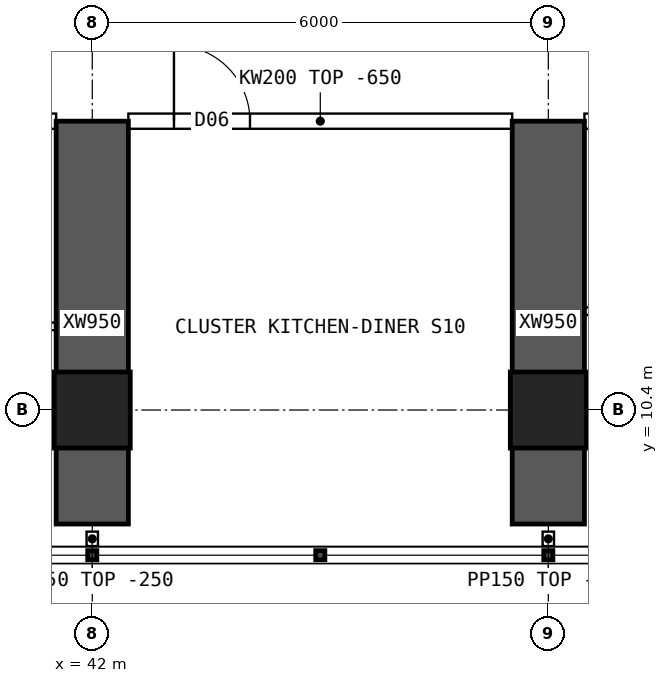
"""IFC4 building model, lengths in metres.
Left out: names, types, materials, properties, quantities, classifications, styles, units other than length and angle.
Written with IfcOpenShell. Run it as: python <this file> out.ifc"""

import sys

from ifc_helpers import new_model, si_unit, direction, frame, frame_2d, origin, origin_2d, place, context, subcontext, project, spatial, polyline, rectangle, hollow_rectangle, outline, extrude, element, fill, save


model = new_model("IFC4")
c1 = context("Model", 3, precision=1e-05, world=origin(), true_north=direction((0.0, 1.0)))
c2 = subcontext(c1, "Body", "Model", "MODEL_VIEW")
j1 = project(units=[si_unit("LENGTHUNIT", "METRE"), si_unit("PLANEANGLEUNIT", "RADIAN")], contexts=[c1])
p1 = place(None, origin())
s1 = spatial("IfcSite", under=j1, at=p1, CompositionType="ELEMENT")
p2 = place(p1, origin())
s2 = spatial("IfcBuilding", under=s1, at=p2, CompositionType="ELEMENT")
p3 = place(p2, frame((0.0, 0.0, 84.4)))
s3 = spatial("IfcBuildingStorey", under=s2, at=p3, CompositionType="ELEMENT", Elevation=84.4)
for number, where, z_axis, x_axis in (
    (1, (42.0, 10.4, 0.0), (0.0, 0.0, 1.0), (1.0, 0.0, 0.0)),
    (2, (48.0, 10.4, 0.0), (0.0, 0.0, 1.0), (1.0, 0.0, 0.0)),
):
    element("IfcColumn", number, at=place(p3, frame(where, z_axis=z_axis, x_axis=x_axis)), inside=s3, PredefinedType="COLUMN", context=c2, shape_type="SweptSolid", body=[
        extrude(hollow_rectangle(XDim=1.0, YDim=1.0, WallThickness=0.1, at=origin_2d()), origin(), (0.0, 0.0, 1.0), 3.75),
    ])
for number, where, z_axis, x_axis in (
    (3, (42.0, 8.9, 0.0), (0.0, 0.0, 1.0), (0.0, 1.0, 0.0)),
    (4, (48.0, 8.9, 0.0), (0.0, 0.0, 1.0), (0.0, 1.0, 0.0)),
):
    element("IfcWall", number, at=place(p3, frame(where, z_axis=z_axis, x_axis=x_axis)), inside=s3, PredefinedType="SHEAR", context=c2, shape_type="SweptSolid", body=[
        extrude(rectangle(XDim=5.3, YDim=0.95, at=frame_2d((2.65, 0.0))), origin(), (0.0, 0.0, 1.0), 3.75),
    ])
p4 = place(p3, frame((36.475, 14.2, 0.0), z_axis=(0.0, 0.0, 1.0), x_axis=(1.0, 0.0, 0.0)))
e5 = element("IfcWall", 5, at=p4, inside=s3, PredefinedType="SOLIDWALL", context=c2, shape_type="SweptSolid", body=[
    extrude(outline(polyline([(0.0, 0.0), (5.05, 0.0), (5.05, 3.1), (0.0, 3.1), (0.0, 0.0)])), frame((0.0, 0.1, 0.0), z_axis=(0.0, -1.0, 0.0), x_axis=(1.0, 0.0, 0.0)), (0.0, 0.0, 1.0), 0.2),
])
p5 = place(p4, frame((0.3, 0.0, 0.0)))
e6 = element("IfcOpeningElement", 6, at=p5, cuts=e5, PredefinedType="OPENING", context=c2, shape_type="SweptSolid", body=[
    extrude(rectangle(XDim=1.0, YDim=2.1, at=frame_2d((0.5, 1.05))), frame((0.0, 0.11, 0.0), z_axis=(0.0, -1.0, 0.0), x_axis=(1.0, 0.0, 0.0)), (0.0, 0.0, 1.0), 0.22),
])
p6 = place(p3, frame((42.475, 14.2, 0.0), z_axis=(0.0, 0.0, 1.0), x_axis=(1.0, 0.0, 0.0)))
e7 = element("IfcWall", 7, at=p6, inside=s3, PredefinedType="SOLIDWALL", context=c2, shape_type="SweptSolid", body=[
    extrude(outline(polyline([(0.0, 0.0), (5.05, 0.0), (5.05, 3.1), (0.0, 3.1), (0.0, 0.0)])), frame((0.0, 0.1, 0.0), z_axis=(0.0, -1.0, 0.0), x_axis=(1.0, 0.0, 0.0)), (0.0, 0.0, 1.0), 0.2),
])
p7 = place(p6, frame((0.6, 0.0, 0.0)))
e8 = element("IfcOpeningElement", 8, at=p7, cuts=e7, PredefinedType="OPENING", context=c2, shape_type="SweptSolid", body=[
    extrude(rectangle(XDim=1.0, YDim=2.1, at=frame_2d((0.5, 1.05))), frame((0.0, 0.11, 0.0), z_axis=(0.0, -1.0, 0.0), x_axis=(1.0, 0.0, 0.0)), (0.0, 0.0, 1.0), 0.22),
])
p8 = place(p3, frame((48.475, 14.2, 0.0), z_axis=(0.0, 0.0, 1.0), x_axis=(1.0, 0.0, 0.0)))
e9 = element("IfcWall", 9, at=p8, inside=s3, PredefinedType="SOLIDWALL", context=c2, shape_type="SweptSolid", body=[
    extrude(outline(polyline([(0.0, 0.0), (5.05, 0.0), (5.05, 3.1), (0.0, 3.1), (0.0, 0.0)])), frame((0.0, 0.1, 0.0), z_axis=(0.0, -1.0, 0.0), x_axis=(1.0, 0.0, 0.0)), (0.0, 0.0, 1.0), 0.2),
])
p9 = place(p8, frame((1.45, 0.0, 0.0)))
e10 = element("IfcOpeningElement", 10, at=p9, cuts=e9, PredefinedType="OPENING", context=c2, shape_type="SweptSolid", body=[
    extrude(rectangle(XDim=0.9, YDim=2.1, at=frame_2d((0.45, 1.05))), frame((0.0, 0.11, 0.0), z_axis=(0.0, -1.0, 0.0), x_axis=(1.0, 0.0, 0.0)), (0.0, 0.0, 1.0), 0.22),
])
p10 = place(p8, frame((2.7, 0.0, 0.0)))
e11 = element("IfcOpeningElement", 11, at=p10, cuts=e9, PredefinedType="OPENING", context=c2, shape_type="SweptSolid", body=[
    extrude(rectangle(XDim=0.9, YDim=2.1, at=frame_2d((0.45, 1.05))), frame((0.0, 0.11, 0.0), z_axis=(0.0, -1.0, 0.0), x_axis=(1.0, 0.0, 0.0)), (0.0, 0.0, 1.0), 0.22),
])
p11 = place(p3, frame((38.875, 11.5, 0.0), z_axis=(0.0, 0.0, 1.0), x_axis=(1.0, 0.0, 0.0)))
e12 = element("IfcWall", 12, at=p11, inside=s3, PredefinedType="PARTITIONING", context=c2, shape_type="SweptSolid", body=[
    extrude(rectangle(XDim=2.65, YDim=0.1, at=frame_2d((1.325, 0.0))), origin(), (0.0, 0.0, 1.0), 3.5),
])
p12 = place(p3, frame((49.875, 11.7, 0.0), z_axis=(0.0, 0.0, 1.0), x_axis=(-1.0, 0.0, 0.0)))
e13 = element("IfcWall", 13, at=p12, inside=s3, PredefinedType="PARTITIONING", context=c2, shape_type="SweptSolid", body=[
    extrude(rectangle(XDim=1.4, YDim=0.1, at=frame_2d((0.7, 0.0))), origin(), (0.0, 0.0, 1.0), 3.5),
])
p13 = place(p12, frame((0.25, 0.0, 0.0)))
e14 = element("IfcOpeningElement", 14, at=p13, cuts=e13, PredefinedType="OPENING", context=c2, shape_type="SweptSolid", body=[
    extrude(rectangle(XDim=0.9, YDim=2.1, at=frame_2d((0.45, 1.05))), frame((0.0, 0.06, 0.0), z_axis=(0.0, -1.0, 0.0), x_axis=(1.0, 0.0, 0.0)), (0.0, 0.0, 1.0), 0.12),
])
for number, where, z_axis, x_axis in (
    (15, (42.0, 8.8, 0.0), (0.0, 0.0, 1.0), (0.0, -1.0, 0.0)),
    (16, (48.0, 8.8, 0.0), (0.0, 0.0, 1.0), (0.0, -1.0, 0.0)),
):
    element("IfcWall", number, at=place(p3, frame(where, z_axis=z_axis, x_axis=x_axis)), inside=s3, PredefinedType="PARTITIONING", context=c2, shape_type="SweptSolid", body=[
        extrude(rectangle(XDim=0.19, YDim=0.15, at=frame_2d((0.095, 0.0))), origin(), (0.0, 0.0, 1.0), 3.5),
    ])
p14 = place(p7, origin())
e17 = element("IfcDoor", 17, at=p14, inside=s3, OperationType="SINGLE_SWING_LEFT", PredefinedType="DOOR", context=c2, shape_type="SweptSolid", body=[
    extrude(rectangle(XDim=1.0, YDim=2.1, at=frame_2d((0.5, 1.05))), frame((0.0, 0.025, 0.0), z_axis=(0.0, -1.0, 0.0), x_axis=(1.0, 0.0, 0.0)), (0.0, 0.0, 1.0), 0.05),
])
fill(e8, e17)
save(model, sys.argv[1])
